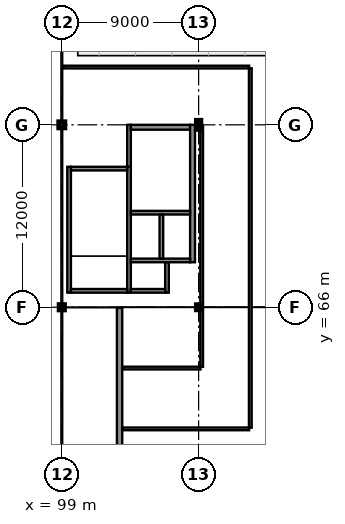
"""IFC4 building model, lengths in metres.
Left out: names, types, materials, properties, quantities, classifications, styles, units other than length and angle.
Written with IfcOpenShell. Run it as: python <this file> out.ifc"""

import sys

from ifc_helpers import new_model, si_unit, direction, frame, frame_2d, origin, origin_2d, place, context, subcontext, project, spatial, rectangle, hollow_circle, i_section, extrude, element, fill, save


model = new_model("IFC4")
c1 = context("Model", 3, precision=1e-05, world=origin(), true_north=direction((0.0, 1.0)))
c2 = subcontext(c1, "Body", "Model", "MODEL_VIEW")
j1 = project(units=[si_unit("LENGTHUNIT", "METRE"), si_unit("PLANEANGLEUNIT", "RADIAN")], contexts=[c1])
p1 = place(None, origin())
s1 = spatial("IfcSite", under=j1, at=p1, CompositionType="ELEMENT")
p2 = place(p1, origin())
s2 = spatial("IfcBuilding", under=s1, at=p2, CompositionType="ELEMENT")
p3 = place(p2, origin())
s3 = spatial("IfcBuildingStorey", under=s2, at=p3, CompositionType="ELEMENT", Elevation=0.0)
p4 = place(p3, frame((99.0, 66.0, 0.0), z_axis=(0.0, 0.0, 1.0), x_axis=(1.0, 0.0, 0.0)))
e1 = element("IfcColumn", 1, at=p4, inside=s3, PredefinedType="PILASTER", context=c2, shape_type="SweptSolid", body=[
    extrude(hollow_circle(Radius=0.178, WallThickness=0.016, at=origin_2d()), origin(), (0.0, 0.0, 1.0), 5.4),
])
p5 = place(p3, frame((99.0, 78.0, 0.0), z_axis=(0.0, 0.0, 1.0), x_axis=(1.0, 0.0, 0.0)))
e2 = element("IfcColumn", 2, at=p5, inside=s3, PredefinedType="COLUMN", context=c2, shape_type="SweptSolid", body=[
    extrude(hollow_circle(Radius=0.203, WallThickness=0.016, at=origin_2d()), origin(), (0.0, 0.0, 1.0), 5.4),
])
p6 = place(p3, frame((108.0, 66.0, 0.0), z_axis=(0.0, 0.0, 1.0), x_axis=(1.0, 0.0, 0.0)))
e3 = element("IfcColumn", 3, at=p6, inside=s3, PredefinedType="COLUMN", context=c2, shape_type="SweptSolid", body=[
    extrude(i_section(OverallWidth=0.3, OverallDepth=0.34, WebThickness=0.012, FlangeThickness=0.021, at=origin_2d()), origin(), (0.0, 0.0, 1.0), 5.4),
])
p7 = place(p3, frame((108.0, 78.0, 0.0), z_axis=(0.0, 0.0, 1.0), x_axis=(0.0, 1.0, 0.0)))
e4 = element("IfcColumn", 4, at=p7, inside=s3, PredefinedType="COLUMN", context=c2, shape_type="SweptSolid", body=[
    extrude(i_section(OverallWidth=0.3, OverallDepth=0.6, WebThickness=0.015, FlangeThickness=0.03, at=origin_2d()), origin(), (0.0, 0.0, 1.0), 5.4),
])
p8 = place(p3, frame((102.8, 65.96, 0.0), z_axis=(0.0, 0.0, 1.0), x_axis=(0.0, -1.0, 0.0)))
e5 = element("IfcWall", 5, at=p8, inside=s3, PredefinedType="SOLIDWALL", context=c2, shape_type="SweptSolid", body=[
    extrude(rectangle(XDim=11.97, YDim=0.35, at=frame_2d((5.985, 0.0))), origin(), (0.0, 0.0, 1.0), 5.08),
])
p9 = place(p8, frame((4.96, 0.0, 0.0)))
e6 = element("IfcOpeningElement", 6, at=p9, cuts=e5, PredefinedType="OPENING", context=c2, shape_type="SweptSolid", body=[
    extrude(rectangle(XDim=2.0, YDim=2.5, at=frame_2d((1.0, 1.25))), frame((0.0, 0.19, 0.0), z_axis=(0.0, -1.0, 0.0), x_axis=(1.0, 0.0, 0.0)), (0.0, 0.0, 1.0), 0.38),
])
p10 = place(p3, frame((99.48, 66.96, 0.0), z_axis=(0.0, 0.0, 1.0), x_axis=(0.0, 1.0, 0.0)))
e7 = element("IfcWall", 7, at=p10, inside=s3, PredefinedType="SHEAR", context=c2, shape_type="SweptSolid", body=[
    extrude(rectangle(XDim=8.28, YDim=0.24, at=frame_2d((4.14, 0.0))), origin(), (0.0, 0.0, 1.0), 5.21),
])
p11 = place(p3, frame((103.42, 66.96, 0.0), z_axis=(0.0, 0.0, 1.0), x_axis=(0.0, 1.0, 0.0)))
e8 = element("IfcWall", 8, at=p11, inside=s3, PredefinedType="SHEAR", context=c2, shape_type="SweptSolid", body=[
    extrude(rectangle(XDim=8.28, YDim=0.24, at=frame_2d((4.14, 0.0))), origin(), (0.0, 0.0, 1.0), 5.21),
])
p12 = place(p11, frame((6.49, 0.0, 0.0)))
e9 = element("IfcOpeningElement", 9, at=p12, cuts=e8, PredefinedType="OPENING", context=c2, shape_type="SweptSolid", body=[
    extrude(rectangle(XDim=1.3, YDim=2.2, at=frame_2d((0.65, 1.1))), frame((0.0, 0.135, 0.0), z_axis=(0.0, -1.0, 0.0), x_axis=(1.0, 0.0, 0.0)), (0.0, 0.0, 1.0), 0.27),
])
for number, where, z_axis, x_axis in (
    (10, (99.6, 67.08, 0.0), (0.0, 0.0, 1.0), (1.0, 0.0, 0.0)),
    (11, (99.6, 75.12, 0.0), (0.0, 0.0, 1.0), (1.0, 0.0, 0.0)),
):
    element("IfcWall", number, at=place(p3, frame(where, z_axis=z_axis, x_axis=x_axis)), inside=s3, PredefinedType="SHEAR", context=c2, shape_type="SweptSolid", body=[
        extrude(rectangle(XDim=3.7, YDim=0.24, at=frame_2d((1.85, 0.0))), origin(), (0.0, 0.0, 1.0), 5.21),
    ])
p13 = place(p3, frame((103.42, 75.24, 0.0), z_axis=(0.0, 0.0, 1.0), x_axis=(0.0, 1.0, 0.0)))
e12 = element("IfcWall", 12, at=p13, inside=s3, PredefinedType="SHEAR", context=c2, shape_type="SweptSolid", body=[
    extrude(rectangle(XDim=2.76, YDim=0.24, at=frame_2d((1.38, 0.0))), origin(), (0.0, 0.0, 1.0), 5.06),
])
p14 = place(p3, frame((103.54, 77.84, 0.0), z_axis=(0.0, 0.0, 1.0), x_axis=(1.0, 0.0, 0.0)))
e13 = element("IfcWall", 13, at=p14, inside=s3, PredefinedType="SHEAR", context=c2, shape_type="SweptSolid", body=[
    extrude(rectangle(XDim=3.9, YDim=0.32, at=frame_2d((1.95, 0.0))), origin(), (0.0, 0.0, 1.0), 5.06),
])
p15 = place(p14, frame((1.225, 0.0, 0.0)))
e14 = element("IfcOpeningElement", 14, at=p15, cuts=e13, PredefinedType="OPENING", context=c2, shape_type="SweptSolid", body=[
    extrude(rectangle(XDim=1.45, YDim=2.2, at=frame_2d((0.725, 1.1))), frame((0.0, 0.175, 0.0), z_axis=(0.0, -1.0, 0.0), x_axis=(1.0, 0.0, 0.0)), (0.0, 0.0, 1.0), 0.35),
])
p16 = place(p3, frame((107.6, 68.96, 0.0), z_axis=(0.0, 0.0, 1.0), x_axis=(0.0, 1.0, 0.0)))
e15 = element("IfcWall", 15, at=p16, inside=s3, PredefinedType="SHEAR", context=c2, shape_type="SweptSolid", body=[
    extrude(rectangle(XDim=9.04, YDim=0.32, at=frame_2d((4.52, 0.0))), origin(), (0.0, 0.0, 1.0), 5.06),
])
p17 = place(p3, frame((103.54, 72.22, 0.0), z_axis=(0.0, 0.0, 1.0), x_axis=(1.0, 0.0, 0.0)))
e16 = element("IfcWall", 16, at=p17, inside=s3, PredefinedType="SHEAR", context=c2, shape_type="SweptSolid", body=[
    extrude(rectangle(XDim=3.9, YDim=0.24, at=frame_2d((1.95, 0.0))), origin(), (0.0, 0.0, 1.0), 5.21),
])
p18 = place(p17, frame((0.385, 0.0, 0.0)))
e17 = element("IfcOpeningElement", 17, at=p18, cuts=e16, PredefinedType="OPENING", context=c2, shape_type="SweptSolid", body=[
    extrude(rectangle(XDim=1.3, YDim=2.2, at=frame_2d((0.65, 1.1))), frame((0.0, 0.135, 0.0), z_axis=(0.0, -1.0, 0.0), x_axis=(1.0, 0.0, 0.0)), (0.0, 0.0, 1.0), 0.27),
])
p19 = place(p17, frame((2.335, 0.0, 0.0)))
e18 = element("IfcOpeningElement", 18, at=p19, cuts=e16, PredefinedType="OPENING", context=c2, shape_type="SweptSolid", body=[
    extrude(rectangle(XDim=1.3, YDim=2.2, at=frame_2d((0.65, 1.1))), frame((0.0, 0.135, 0.0), z_axis=(0.0, -1.0, 0.0), x_axis=(1.0, 0.0, 0.0)), (0.0, 0.0, 1.0), 0.27),
])
p20 = place(p3, frame((103.54, 69.08, 0.0), z_axis=(0.0, 0.0, 1.0), x_axis=(1.0, 0.0, 0.0)))
e19 = element("IfcWall", 19, at=p20, inside=s3, PredefinedType="SHEAR", context=c2, shape_type="SweptSolid", body=[
    extrude(rectangle(XDim=3.9, YDim=0.24, at=frame_2d((1.95, 0.0))), origin(), (0.0, 0.0, 1.0), 5.21),
])
p21 = place(p3, frame((105.55, 69.2, 0.0), z_axis=(0.0, 0.0, 1.0), x_axis=(0.0, 1.0, 0.0)))
e20 = element("IfcWall", 20, at=p21, inside=s3, PredefinedType="SHEAR", context=c2, shape_type="SweptSolid", body=[
    extrude(rectangle(XDim=2.9, YDim=0.24, at=frame_2d((1.45, 0.0))), origin(), (0.0, 0.0, 1.0), 5.21),
])
p22 = place(p3, frame((105.92, 66.96, 0.0), z_axis=(0.0, 0.0, 1.0), x_axis=(0.0, 1.0, 0.0)))
e21 = element("IfcWall", 21, at=p22, inside=s3, PredefinedType="SHEAR", context=c2, shape_type="SweptSolid", body=[
    extrude(rectangle(XDim=2.0, YDim=0.24, at=frame_2d((1.0, 0.0))), origin(), (0.0, 0.0, 1.0), 5.21),
])
p23 = place(p3, frame((103.54, 67.08, 0.0), z_axis=(0.0, 0.0, 1.0), x_axis=(1.0, 0.0, 0.0)))
e22 = element("IfcWall", 22, at=p23, inside=s3, PredefinedType="SHEAR", context=c2, shape_type="SweptSolid", body=[
    extrude(rectangle(XDim=2.26, YDim=0.24, at=frame_2d((1.13, 0.0))), origin(), (0.0, 0.0, 1.0), 5.21),
])
p24 = place(p3, frame((99.125, 81.8, 0.0), z_axis=(0.0, 0.0, 1.0), x_axis=(1.0, 0.0, 0.0)))
e23 = element("IfcWall", 23, at=p24, inside=s3, PredefinedType="PARTITIONING", context=c2, shape_type="SweptSolid", body=[
    extrude(rectangle(XDim=12.195, YDim=0.18, at=frame_2d((6.098, 0.0))), origin(), (0.0, 0.0, 1.0), 5.04),
])
p25 = place(p24, frame((5.248, 0.0, 0.0)))
e24 = element("IfcOpeningElement", 24, at=p25, cuts=e23, PredefinedType="OPENING", context=c2, shape_type="SweptSolid", body=[
    extrude(rectangle(XDim=1.7, YDim=2.4, at=frame_2d((0.85, 1.2))), frame((0.0, 0.105, 0.0), z_axis=(0.0, -1.0, 0.0), x_axis=(1.0, 0.0, 0.0)), (0.0, 0.0, 1.0), 0.21),
])
p26 = place(p24, frame((9.245, 0.0, 1.05)))
e25 = element("IfcOpeningElement", 25, at=p26, cuts=e23, PredefinedType="OPENING", context=c2, shape_type="SweptSolid", body=[
    extrude(rectangle(XDim=2.1, YDim=1.2, at=frame_2d((1.05, 0.6))), frame((0.0, 0.105, 0.0), z_axis=(0.0, -1.0, 0.0), x_axis=(1.0, 0.0, 0.0)), (0.0, 0.0, 1.0), 0.21),
])
p27 = place(p3, frame((111.4, 81.72, 0.0), z_axis=(0.0, 0.0, 1.0), x_axis=(0.0, -1.0, 0.0)))
e26 = element("IfcWall", 26, at=p27, inside=s3, PredefinedType="PARTITIONING", context=c2, shape_type="SweptSolid", body=[
    extrude(rectangle(XDim=23.64, YDim=0.18, at=frame_2d((11.82, 0.0))), origin(), (0.0, 0.0, 1.0), 5.04),
])
p28 = place(p27, frame((11.095, 0.0, 0.0)))
e27 = element("IfcOpeningElement", 27, at=p28, cuts=e26, PredefinedType="OPENING", context=c2, shape_type="SweptSolid", body=[
    extrude(rectangle(XDim=1.45, YDim=2.2, at=frame_2d((0.725, 1.1))), frame((0.0, 0.105, 0.0), z_axis=(0.0, -1.0, 0.0), x_axis=(1.0, 0.0, 0.0)), (0.0, 0.0, 1.0), 0.21),
])
p29 = place(p3, frame((111.32, 58.0, 0.0), z_axis=(0.0, 0.0, 1.0), x_axis=(-1.0, 0.0, 0.0)))
e28 = element("IfcWall", 28, at=p29, inside=s3, PredefinedType="PARTITIONING", context=c2, shape_type="SweptSolid", body=[
    extrude(rectangle(XDim=8.35, YDim=0.18, at=frame_2d((4.175, 0.0))), origin(), (0.0, 0.0, 1.0), 5.04),
])
p30 = place(p29, frame((3.45, 0.0, 0.0)))
e29 = element("IfcOpeningElement", 29, at=p30, cuts=e28, PredefinedType="OPENING", context=c2, shape_type="SweptSolid", body=[
    extrude(rectangle(XDim=1.45, YDim=2.2, at=frame_2d((0.725, 1.1))), frame((0.0, 0.105, 0.0), z_axis=(0.0, -1.0, 0.0), x_axis=(1.0, 0.0, 0.0)), (0.0, 0.0, 1.0), 0.21),
])
p31 = place(p3, frame((102.97, 62.0, 0.0), z_axis=(0.0, 0.0, 1.0), x_axis=(1.0, 0.0, 0.0)))
e30 = element("IfcWall", 30, at=p31, inside=s3, PredefinedType="PARTITIONING", context=c2, shape_type="SweptSolid", body=[
    extrude(rectangle(XDim=5.15, YDim=0.18, at=frame_2d((2.575, 0.0))), origin(), (0.0, 0.0, 1.0), 5.04),
])
p32 = place(p3, frame((108.2, 62.08, 0.0), z_axis=(0.0, 0.0, 1.0), x_axis=(0.0, 1.0, 0.0)))
e31 = element("IfcWall", 31, at=p32, inside=s3, PredefinedType="PARTITIONING", context=c2, shape_type="SweptSolid", body=[
    extrude(rectangle(XDim=15.84, YDim=0.18, at=frame_2d((7.92, 0.0))), origin(), (0.0, 0.0, 1.0), 4.705),
])
p33 = place(p9, frame((2.0, 0.0, 0.0), z_axis=(0.0, 0.0, 1.0), x_axis=(-1.0, 0.0, 0.0)))
e32 = element("IfcDoor", 32, at=p33, inside=s3, OperationType="DOUBLE_DOOR_SINGLE_SWING", PredefinedType="DOOR", context=c2, shape_type="SweptSolid", body=[
    extrude(rectangle(XDim=2.0, YDim=2.5, at=frame_2d((1.0, 1.25))), frame((0.0, 0.025, 0.0), z_axis=(0.0, -1.0, 0.0), x_axis=(1.0, 0.0, 0.0)), (0.0, 0.0, 1.0), 0.05),
])
fill(e6, e32)
p34 = place(p12, frame((1.3, 0.0, 0.0), z_axis=(0.0, 0.0, 1.0), x_axis=(-1.0, 0.0, 0.0)))
e33 = element("IfcDoor", 33, at=p34, inside=s3, OperationType="SINGLE_SWING_LEFT", PredefinedType="DOOR", context=c2, shape_type="SweptSolid", body=[
    extrude(rectangle(XDim=1.3, YDim=2.2, at=frame_2d((0.65, 1.1))), frame((0.0, 0.025, 0.0), z_axis=(0.0, -1.0, 0.0), x_axis=(1.0, 0.0, 0.0)), (0.0, 0.0, 1.0), 0.05),
])
fill(e9, e33)
p35 = place(p15, origin())
e34 = element("IfcDoor", 34, at=p35, inside=s3, OperationType="DOUBLE_DOOR_SINGLE_SWING", PredefinedType="DOOR", context=c2, shape_type="SweptSolid", body=[
    extrude(rectangle(XDim=1.45, YDim=2.2, at=frame_2d((0.725, 1.1))), frame((0.0, 0.025, 0.0), z_axis=(0.0, -1.0, 0.0), x_axis=(1.0, 0.0, 0.0)), (0.0, 0.0, 1.0), 0.05),
])
fill(e14, e34)
p36 = place(p18, origin())
e35 = element("IfcDoor", 35, at=p36, inside=s3, OperationType="DOUBLE_DOOR_SLIDING", PredefinedType="DOOR", context=c2, shape_type="SweptSolid", body=[
    extrude(rectangle(XDim=1.3, YDim=2.2, at=frame_2d((0.65, 1.1))), frame((0.0, 0.025, 0.0), z_axis=(0.0, -1.0, 0.0), x_axis=(1.0, 0.0, 0.0)), (0.0, 0.0, 1.0), 0.05),
])
fill(e17, e35)
p37 = place(p19, origin())
e36 = element("IfcDoor", 36, at=p37, inside=s3, OperationType="DOUBLE_DOOR_SLIDING", PredefinedType="DOOR", context=c2, shape_type="SweptSolid", body=[
    extrude(rectangle(XDim=1.3, YDim=2.2, at=frame_2d((0.65, 1.1))), frame((0.0, 0.025, 0.0), z_axis=(0.0, -1.0, 0.0), x_axis=(1.0, 0.0, 0.0)), (0.0, 0.0, 1.0), 0.05),
])
fill(e18, e36)
p38 = place(p28, origin())
e37 = element("IfcDoor", 37, at=p38, inside=s3, OperationType="DOUBLE_DOOR_SINGLE_SWING", PredefinedType="DOOR", context=c2, shape_type="SweptSolid", body=[
    extrude(rectangle(XDim=1.45, YDim=2.2, at=frame_2d((0.725, 1.1))), frame((0.0, 0.025, 0.0), z_axis=(0.0, -1.0, 0.0), x_axis=(1.0, 0.0, 0.0)), (0.0, 0.0, 1.0), 0.05),
])
fill(e27, e37)
p39 = place(p30, origin())
e38 = element("IfcDoor", 38, at=p39, inside=s3, OperationType="DOUBLE_DOOR_SINGLE_SWING", PredefinedType="DOOR", context=c2, shape_type="SweptSolid", body=[
    extrude(rectangle(XDim=1.45, YDim=2.2, at=frame_2d((0.725, 1.1))), frame((0.0, 0.025, 0.0), z_axis=(0.0, -1.0, 0.0), x_axis=(1.0, 0.0, 0.0)), (0.0, 0.0, 1.0), 0.05),
])
fill(e29, e38)
p40 = place(p25, origin())
e39 = element("IfcDoor", 39, at=p40, inside=s3, OperationType="DOUBLE_DOOR_SINGLE_SWING", PredefinedType="DOOR", context=c2, shape_type="SweptSolid", body=[
    extrude(rectangle(XDim=1.7, YDim=2.4, at=frame_2d((0.85, 1.2))), frame((0.0, 0.025, 0.0), z_axis=(0.0, -1.0, 0.0), x_axis=(1.0, 0.0, 0.0)), (0.0, 0.0, 1.0), 0.05),
])
fill(e24, e39)
p41 = place(p26, origin())
e40 = element("IfcWindow", 40, at=p41, inside=s3, PartitioningType="SINGLE_PANEL", PredefinedType="WINDOW", context=c2, shape_type="SweptSolid", body=[
    extrude(rectangle(XDim=2.1, YDim=1.2, at=frame_2d((1.05, 0.6))), frame((0.0, 0.03, 0.0), z_axis=(0.0, -1.0, 0.0), x_axis=(1.0, 0.0, 0.0)), (0.0, 0.0, 1.0), 0.06),
])
fill(e25, e40)
save(model, sys.argv[1])
